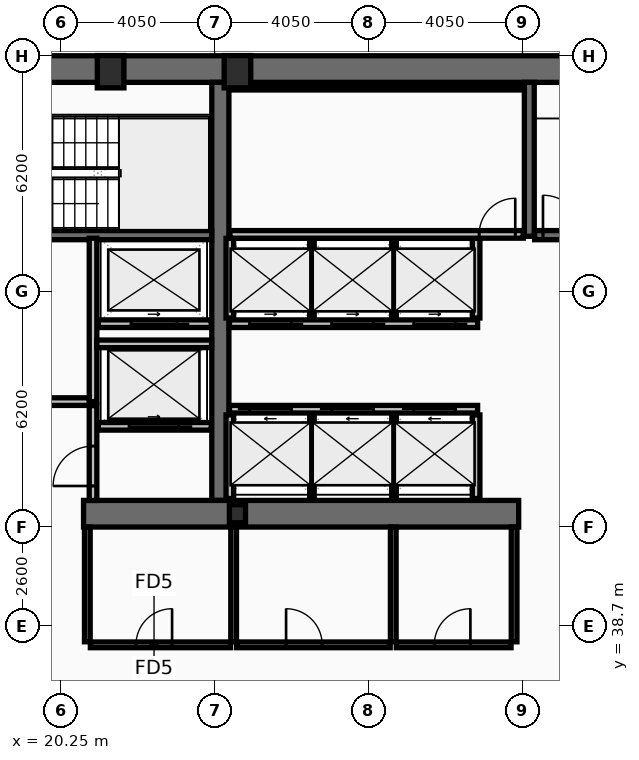
"""IFC4 building model, lengths in metres.
Left out: names, types, materials, properties, quantities, classifications, styles, units other than length and angle.
Written with IfcOpenShell. Run it as: python <this file> out.ifc"""

import sys

from ifc_helpers import new_model, si_unit, direction, frame, frame_2d, origin, origin_2d, place, context, subcontext, project, spatial, rectangle, hollow_rectangle, i_section, extrude, element, fill, save


model = new_model("IFC4")
c1 = context("Model", 3, precision=1e-05, world=origin(), true_north=direction((0.0, 1.0)))
c2 = subcontext(c1, "Body", "Model", "MODEL_VIEW")
j1 = project(units=[si_unit("LENGTHUNIT", "METRE"), si_unit("PLANEANGLEUNIT", "RADIAN")], contexts=[c1])
p1 = place(None, origin())
s1 = spatial("IfcSite", under=j1, at=p1, CompositionType="ELEMENT")
p2 = place(p1, origin())
s2 = spatial("IfcBuilding", under=s1, at=p2, CompositionType="ELEMENT")
p3 = place(p2, frame((0.0, 0.0, 106.6)))
s3 = spatial("IfcBuildingStorey", under=s2, at=p3, CompositionType="ELEMENT", Elevation=106.6)
p4 = place(p3, frame((16.2, 53.35, 0.0), z_axis=(0.0, 0.0, 1.0), x_axis=(1.0, 0.0, 0.0)))
e1 = element("IfcWall", 1, at=p4, inside=s3, PredefinedType="SHEAR", context=c2, shape_type="SweptSolid", body=[
    extrude(rectangle(XDim=40.5, YDim=0.7, at=frame_2d((20.25, 0.0))), origin(), (0.0, 0.0, 1.0), 4.24),
])
p5 = place(p3, frame((24.45, 42.0, 0.0), z_axis=(0.0, 0.0, 1.0), x_axis=(0.0, 1.0, 0.0)))
e2 = element("IfcWall", 2, at=p5, inside=s3, PredefinedType="SHEAR", context=c2, shape_type="SweptSolid", body=[
    extrude(rectangle(XDim=11.0, YDim=0.45, at=frame_2d((5.5, 0.0))), origin(), (0.0, 0.0, 1.0), 4.24),
])
p6 = place(p3, frame((32.3, 41.65, 0.0), z_axis=(0.0, 0.0, 1.0), x_axis=(-1.0, 0.0, 0.0)))
e3 = element("IfcWall", 3, at=p6, inside=s3, PredefinedType="SHEAR", context=c2, shape_type="SweptSolid", body=[
    extrude(rectangle(XDim=11.45, YDim=0.7, at=frame_2d((5.725, 0.0))), origin(), (0.0, 0.0, 1.0), 4.24),
])
p7 = place(p3, frame((32.58, 48.95, 0.0), z_axis=(0.0, 0.0, 1.0), x_axis=(0.0, 1.0, 0.0)))
e4 = element("IfcWall", 4, at=p7, inside=s3, PredefinedType="SHEAR", context=c2, shape_type="SweptSolid", body=[
    extrude(rectangle(XDim=4.05, YDim=0.26, at=frame_2d((2.025, 0.0))), origin(), (0.0, 0.0, 1.0), 4.24),
])
p8 = place(p3, frame((16.9, 48.98, 0.0), z_axis=(0.0, 0.0, 1.0), x_axis=(1.0, 0.0, 0.0)))
e5 = element("IfcWall", 5, at=p8, inside=s3, PredefinedType="SHEAR", context=c2, shape_type="SweptSolid", body=[
    extrude(rectangle(XDim=7.32, YDim=0.24, at=frame_2d((3.66, 0.0))), origin(), (0.0, 0.0, 1.0), 4.24),
])
p9 = place(p8, frame((0.22, 0.0, 0.0)))
e6 = element("IfcOpeningElement", 6, at=p9, cuts=e5, PredefinedType="OPENING", context=c2, shape_type="SweptSolid", body=[
    extrude(rectangle(XDim=1.05, YDim=2.15, at=frame_2d((0.525, 1.075))), frame((0.0, 0.13, 0.0), z_axis=(0.0, -1.0, 0.0), x_axis=(1.0, 0.0, 0.0)), (0.0, 0.0, 1.0), 0.26),
])
p10 = place(p3, frame((32.72, 48.98, 0.0), z_axis=(0.0, 0.0, 1.0), x_axis=(1.0, 0.0, 0.0)))
e7 = element("IfcWall", 7, at=p10, inside=s3, PredefinedType="SHEAR", context=c2, shape_type="SweptSolid", body=[
    extrude(rectangle(XDim=7.56, YDim=0.24, at=frame_2d((3.78, 0.0))), origin(), (0.0, 0.0, 1.0), 4.24),
])
p11 = place(p10, frame((0.22, 0.0, 0.0)))
e8 = element("IfcOpeningElement", 8, at=p11, cuts=e7, PredefinedType="OPENING", context=c2, shape_type="SweptSolid", body=[
    extrude(rectangle(XDim=1.05, YDim=2.15, at=frame_2d((0.525, 1.075))), frame((0.0, 0.13, 0.0), z_axis=(0.0, -1.0, 0.0), x_axis=(1.0, 0.0, 0.0)), (0.0, 0.0, 1.0), 0.26),
])
for number, where, z_axis, x_axis in (
    (9, (21.562, 53.28, 0.0), (0.0, 0.0, 1.0), (1.0, 0.0, 0.0)),
    (10, (24.9, 53.28, 0.0), (0.0, 0.0, 1.0), (1.0, 0.0, 0.0)),
):
    element("IfcColumn", number, at=place(p3, frame(where, z_axis=z_axis, x_axis=x_axis)), inside=s3, PredefinedType="COLUMN", context=c2, shape_type="SweptSolid", body=[
        extrude(hollow_rectangle(XDim=0.7, YDim=0.85, WallThickness=0.05, at=origin_2d()), origin(), (0.0, 0.0, 1.0), 4.4),
    ])
p12 = place(p3, frame((24.9, 41.65, 0.0), z_axis=(0.0, 0.0, 1.0), x_axis=(1.0, 0.0, 0.0)))
e11 = element("IfcColumn", 11, at=p12, inside=s3, PredefinedType="COLUMN", context=c2, shape_type="SweptSolid", body=[
    extrude(i_section(OverallWidth=0.424, OverallDepth=0.474, WebThickness=0.048, FlangeThickness=0.077, at=origin_2d()), origin(), (0.0, 0.0, 1.0), 4.4),
])
p13 = place(p3, frame((24.69, 44.4, 0.0), z_axis=(0.0, 0.0, 1.0), x_axis=(1.0, 0.0, 0.0)))
e12 = element("IfcWall", 12, at=p13, inside=s3, PredefinedType="PARTITIONING", context=c2, shape_type="SweptSolid", body=[
    extrude(rectangle(XDim=6.53, YDim=0.2, at=frame_2d((3.265, 0.0))), origin(), (0.0, 0.0, 1.0), 4.24),
])
p14 = place(p13, frame((0.53, 0.0, 0.0)))
e13 = element("IfcOpeningElement", 13, at=p14, cuts=e12, PredefinedType="OPENING", context=c2, shape_type="SweptSolid", body=[
    extrude(rectangle(XDim=1.1, YDim=2.18, at=frame_2d((0.55, 1.09))), frame((0.0, 0.11, 0.0), z_axis=(0.0, -1.0, 0.0), x_axis=(1.0, 0.0, 0.0)), (0.0, 0.0, 1.0), 0.22),
])
p15 = place(p13, frame((2.69, 0.0, 0.0)))
e14 = element("IfcOpeningElement", 14, at=p15, cuts=e12, PredefinedType="OPENING", context=c2, shape_type="SweptSolid", body=[
    extrude(rectangle(XDim=1.1, YDim=2.18, at=frame_2d((0.55, 1.09))), frame((0.0, 0.11, 0.0), z_axis=(0.0, -1.0, 0.0), x_axis=(1.0, 0.0, 0.0)), (0.0, 0.0, 1.0), 0.22),
])
p16 = place(p13, frame((4.85, 0.0, 0.0)))
e15 = element("IfcOpeningElement", 15, at=p16, cuts=e12, PredefinedType="OPENING", context=c2, shape_type="SweptSolid", body=[
    extrude(rectangle(XDim=1.1, YDim=2.18, at=frame_2d((0.55, 1.09))), frame((0.0, 0.11, 0.0), z_axis=(0.0, -1.0, 0.0), x_axis=(1.0, 0.0, 0.0)), (0.0, 0.0, 1.0), 0.22),
])
p17 = place(p3, frame((24.21, 43.95, 0.0), z_axis=(0.0, 0.0, 1.0), x_axis=(-1.0, 0.0, 0.0)))
e16 = element("IfcWall", 16, at=p17, inside=s3, PredefinedType="PARTITIONING", context=c2, shape_type="SweptSolid", body=[
    extrude(rectangle(XDim=2.97, YDim=0.2, at=frame_2d((1.485, 0.0))), origin(), (0.0, 0.0, 1.0), 4.24),
])
p18 = place(p17, frame((0.86, 0.0, 0.0)))
e17 = element("IfcOpeningElement", 17, at=p18, cuts=e16, PredefinedType="OPENING", context=c2, shape_type="SweptSolid", body=[
    extrude(rectangle(XDim=1.3, YDim=2.18, at=frame_2d((0.65, 1.09))), frame((0.0, 0.11, 0.0), z_axis=(0.0, -1.0, 0.0), x_axis=(1.0, 0.0, 0.0)), (0.0, 0.0, 1.0), 0.22),
])
p19 = place(p3, frame((24.21, 46.65, 0.0), z_axis=(0.0, 0.0, 1.0), x_axis=(-1.0, 0.0, 0.0)))
e18 = element("IfcWall", 18, at=p19, inside=s3, PredefinedType="PARTITIONING", context=c2, shape_type="SweptSolid", body=[
    extrude(rectangle(XDim=2.97, YDim=0.2, at=frame_2d((1.485, 0.0))), origin(), (0.0, 0.0, 1.0), 4.24),
])
p20 = place(p19, frame((0.91, 0.0, 0.0)))
e19 = element("IfcOpeningElement", 19, at=p20, cuts=e18, PredefinedType="OPENING", context=c2, shape_type="SweptSolid", body=[
    extrude(rectangle(XDim=1.2, YDim=2.18, at=frame_2d((0.6, 1.09))), frame((0.0, 0.11, 0.0), z_axis=(0.0, -1.0, 0.0), x_axis=(1.0, 0.0, 0.0)), (0.0, 0.0, 1.0), 0.22),
])
p21 = place(p3, frame((31.22, 46.65, 0.0), z_axis=(0.0, 0.0, 1.0), x_axis=(-1.0, 0.0, 0.0)))
e20 = element("IfcWall", 20, at=p21, inside=s3, PredefinedType="PARTITIONING", context=c2, shape_type="SweptSolid", body=[
    extrude(rectangle(XDim=6.53, YDim=0.2, at=frame_2d((3.265, 0.0))), origin(), (0.0, 0.0, 1.0), 4.24),
])
p22 = place(p21, frame((4.9, 0.0, 0.0)))
e21 = element("IfcOpeningElement", 21, at=p22, cuts=e20, PredefinedType="OPENING", context=c2, shape_type="SweptSolid", body=[
    extrude(rectangle(XDim=1.1, YDim=2.18, at=frame_2d((0.55, 1.09))), frame((0.0, 0.11, 0.0), z_axis=(0.0, -1.0, 0.0), x_axis=(1.0, 0.0, 0.0)), (0.0, 0.0, 1.0), 0.22),
])
p23 = place(p21, frame((2.74, 0.0, 0.0)))
e22 = element("IfcOpeningElement", 22, at=p23, cuts=e20, PredefinedType="OPENING", context=c2, shape_type="SweptSolid", body=[
    extrude(rectangle(XDim=1.1, YDim=2.18, at=frame_2d((0.55, 1.09))), frame((0.0, 0.11, 0.0), z_axis=(0.0, -1.0, 0.0), x_axis=(1.0, 0.0, 0.0)), (0.0, 0.0, 1.0), 0.22),
])
p24 = place(p21, frame((0.58, 0.0, 0.0)))
e23 = element("IfcOpeningElement", 23, at=p24, cuts=e20, PredefinedType="OPENING", context=c2, shape_type="SweptSolid", body=[
    extrude(rectangle(XDim=1.1, YDim=2.18, at=frame_2d((0.55, 1.09))), frame((0.0, 0.11, 0.0), z_axis=(0.0, -1.0, 0.0), x_axis=(1.0, 0.0, 0.0)), (0.0, 0.0, 1.0), 0.22),
])
p25 = place(p3, frame((21.1, 44.6, 0.0), z_axis=(0.0, 0.0, 1.0), x_axis=(0.0, 1.0, 0.0)))
e24 = element("IfcWall", 24, at=p25, inside=s3, PredefinedType="PARTITIONING", context=c2, shape_type="SweptSolid", body=[
    extrude(rectangle(XDim=4.3, YDim=0.2, at=frame_2d((2.15, 0.0))), origin(), (0.0, 0.0, 1.0), 4.24),
])
p26 = place(p3, frame((16.9, 44.6, 0.0), z_axis=(0.0, 0.0, 1.0), x_axis=(1.0, 0.0, 0.0)))
e25 = element("IfcWall", 25, at=p26, inside=s3, PredefinedType="PARTITIONING", context=c2, shape_type="SweptSolid", body=[
    extrude(rectangle(XDim=4.1, YDim=0.2, at=frame_2d((2.05, 0.0))), origin(), (0.0, 0.0, 1.0), 4.24),
])
p27 = place(p26, frame((1.25, 0.0, 0.0)))
e26 = element("IfcOpeningElement", 26, at=p27, cuts=e25, PredefinedType="OPENING", context=c2, shape_type="SweptSolid", body=[
    extrude(rectangle(XDim=1.05, YDim=2.15, at=frame_2d((0.525, 1.075))), frame((0.0, 0.11, 0.0), z_axis=(0.0, -1.0, 0.0), x_axis=(1.0, 0.0, 0.0)), (0.0, 0.0, 1.0), 0.22),
])
p28 = place(p3, frame((21.2, 46.12, 0.0), z_axis=(0.0, 0.0, 1.0), x_axis=(1.0, 0.0, 0.0)))
e27 = element("IfcWall", 27, at=p28, inside=s3, PredefinedType="PARTITIONING", context=c2, shape_type="SweptSolid", body=[
    extrude(rectangle(XDim=3.02, YDim=0.2, at=frame_2d((1.51, 0.0))), origin(), (0.0, 0.0, 1.0), 4.24),
])
p29 = place(p3, frame((21.1, 42.0, 0.0), z_axis=(0.0, 0.0, 1.0), x_axis=(0.0, 1.0, 0.0)))
e28 = element("IfcWall", 28, at=p29, inside=s3, PredefinedType="PARTITIONING", context=c2, shape_type="SweptSolid", body=[
    extrude(rectangle(XDim=2.495, YDim=0.2, at=frame_2d((1.248, 0.0))), origin(), (0.0, 0.0, 1.0), 4.24),
])
p30 = place(p29, frame((0.38, 0.0, 0.0)))
e29 = element("IfcOpeningElement", 29, at=p30, cuts=e28, PredefinedType="OPENING", context=c2, shape_type="SweptSolid", body=[
    extrude(rectangle(XDim=1.05, YDim=2.15, at=frame_2d((0.525, 1.075))), frame((0.0, 0.11, 0.0), z_axis=(0.0, -1.0, 0.0), x_axis=(1.0, 0.0, 0.0)), (0.0, 0.0, 1.0), 0.22),
])
for number, where, z_axis, x_axis in (
    (30, (24.7, 46.8, 0.0), (0.0, 0.0, 1.0), (0.0, 1.0, 0.0)),
    (31, (31.18, 46.8, 0.0), (0.0, 0.0, 1.0), (0.0, 1.0, 0.0)),
):
    element("IfcWall", number, at=place(p3, frame(where, z_axis=z_axis, x_axis=x_axis)), inside=s3, PredefinedType="PARTITIONING", context=c2, shape_type="SweptSolid", body=[
        extrude(rectangle(XDim=2.095, YDim=0.2, at=frame_2d((1.047, 0.0))), origin(), (0.0, 0.0, 1.0), 4.24),
    ])
for number, where, z_axis, x_axis in (
    (32, (26.86, 46.8, 0.0), (0.0, 0.0, 1.0), (0.0, 1.0, 0.0)),
    (33, (29.02, 46.8, 0.0), (0.0, 0.0, 1.0), (0.0, 1.0, 0.0)),
):
    element("IfcWall", number, at=place(p3, frame(where, z_axis=z_axis, x_axis=x_axis)), inside=s3, PredefinedType="PARTITIONING", context=c2, shape_type="SweptSolid", body=[
        extrude(rectangle(XDim=2.095, YDim=0.12, at=frame_2d((1.047, 0.0))), origin(), (0.0, 0.0, 1.0), 4.24),
    ])
for number, where, z_axis, x_axis in (
    (34, (24.7, 42.05, 0.0), (0.0, 0.0, 1.0), (0.0, 1.0, 0.0)),
    (35, (31.18, 42.05, 0.0), (0.0, 0.0, 1.0), (0.0, 1.0, 0.0)),
):
    element("IfcWall", number, at=place(p3, frame(where, z_axis=z_axis, x_axis=x_axis)), inside=s3, PredefinedType="PARTITIONING", context=c2, shape_type="SweptSolid", body=[
        extrude(rectangle(XDim=2.2, YDim=0.2, at=frame_2d((1.1, 0.0))), origin(), (0.0, 0.0, 1.0), 4.24),
    ])
for number, where, z_axis, x_axis in (
    (36, (26.86, 42.05, 0.0), (0.0, 0.0, 1.0), (0.0, 1.0, 0.0)),
    (37, (29.02, 42.05, 0.0), (0.0, 0.0, 1.0), (0.0, 1.0, 0.0)),
):
    element("IfcWall", number, at=place(p3, frame(where, z_axis=z_axis, x_axis=x_axis)), inside=s3, PredefinedType="PARTITIONING", context=c2, shape_type="SweptSolid", body=[
        extrude(rectangle(XDim=2.2, YDim=0.12, at=frame_2d((1.1, 0.0))), origin(), (0.0, 0.0, 1.0), 4.24),
    ])
p31 = place(p3, frame((24.7, 52.86, 0.0), z_axis=(0.0, 0.0, 1.0), x_axis=(1.0, 0.0, 0.0)))
e38 = element("IfcWall", 38, at=p31, inside=s3, PredefinedType="PARTITIONING", context=c2, shape_type="SweptSolid", body=[
    extrude(rectangle(XDim=7.72, YDim=0.12, at=frame_2d((3.86, 0.0))), origin(), (0.0, 0.0, 1.0), 4.24),
])
p32 = place(p3, frame((24.7, 49.0, 0.0), z_axis=(0.0, 0.0, 1.0), x_axis=(1.0, 0.0, 0.0)))
e39 = element("IfcWall", 39, at=p32, inside=s3, PredefinedType="PARTITIONING", context=c2, shape_type="SweptSolid", body=[
    extrude(rectangle(XDim=7.72, YDim=0.2, at=frame_2d((3.86, 0.0))), origin(), (0.0, 0.0, 1.0), 4.24),
])
p33 = place(p32, frame((6.56, 0.0, 0.0)))
e40 = element("IfcOpeningElement", 40, at=p33, cuts=e39, PredefinedType="OPENING", context=c2, shape_type="SweptSolid", body=[
    extrude(rectangle(XDim=0.95, YDim=2.1, at=frame_2d((0.475, 1.05))), frame((0.0, 0.11, 0.0), z_axis=(0.0, -1.0, 0.0), x_axis=(1.0, 0.0, 0.0)), (0.0, 0.0, 1.0), 0.22),
])
p34 = place(p3, frame((21.03, 38.2, 0.0), z_axis=(0.0, 0.0, 1.0), x_axis=(1.0, 0.0, 0.0)))
e41 = element("IfcWall", 41, at=p34, inside=s3, PredefinedType="PARTITIONING", context=c2, shape_type="SweptSolid", body=[
    extrude(rectangle(XDim=3.69, YDim=0.15, at=frame_2d((1.845, 0.0))), origin(), (0.0, 0.0, 1.0), 3.53),
])
p35 = place(p34, frame((1.2, 0.0, 0.0)))
e42 = element("IfcOpeningElement", 42, at=p35, cuts=e41, PredefinedType="OPENING", context=c2, shape_type="SweptSolid", body=[
    extrude(rectangle(XDim=0.95, YDim=2.05, at=frame_2d((0.475, 1.025))), frame((0.0, 0.085, 0.0), z_axis=(0.0, -1.0, 0.0), x_axis=(1.0, 0.0, 0.0)), (0.0, 0.0, 1.0), 0.17),
])
p36 = place(p3, frame((24.88, 38.2, 0.0), z_axis=(0.0, 0.0, 1.0), x_axis=(1.0, 0.0, 0.0)))
e43 = element("IfcWall", 43, at=p36, inside=s3, PredefinedType="PARTITIONING", context=c2, shape_type="SweptSolid", body=[
    extrude(rectangle(XDim=4.04, YDim=0.15, at=frame_2d((2.02, 0.0))), origin(), (0.0, 0.0, 1.0), 3.53),
])
p37 = place(p36, frame((1.3, 0.0, 0.0)))
e44 = element("IfcOpeningElement", 44, at=p37, cuts=e43, PredefinedType="OPENING", context=c2, shape_type="SweptSolid", body=[
    extrude(rectangle(XDim=0.95, YDim=2.05, at=frame_2d((0.475, 1.025))), frame((0.0, 0.085, 0.0), z_axis=(0.0, -1.0, 0.0), x_axis=(1.0, 0.0, 0.0)), (0.0, 0.0, 1.0), 0.17),
])
p38 = place(p3, frame((29.08, 38.2, 0.0), z_axis=(0.0, 0.0, 1.0), x_axis=(1.0, 0.0, 0.0)))
e45 = element("IfcWall", 45, at=p38, inside=s3, PredefinedType="PARTITIONING", context=c2, shape_type="SweptSolid", body=[
    extrude(rectangle(XDim=3.02, YDim=0.15, at=frame_2d((1.51, 0.0))), origin(), (0.0, 0.0, 1.0), 3.53),
])
p39 = place(p38, frame((1.0, 0.0, 0.0)))
e46 = element("IfcOpeningElement", 46, at=p39, cuts=e45, PredefinedType="OPENING", context=c2, shape_type="SweptSolid", body=[
    extrude(rectangle(XDim=0.95, YDim=2.05, at=frame_2d((0.475, 1.025))), frame((0.0, 0.085, 0.0), z_axis=(0.0, -1.0, 0.0), x_axis=(1.0, 0.0, 0.0)), (0.0, 0.0, 1.0), 0.17),
])
p40 = place(p3, frame((20.95, 38.28, 0.0), z_axis=(0.0, 0.0, 1.0), x_axis=(0.0, 1.0, 0.0)))
e47 = element("IfcWall", 47, at=p40, inside=s3, PredefinedType="PARTITIONING", context=c2, shape_type="SweptSolid", body=[
    extrude(rectangle(XDim=3.02, YDim=0.15, at=frame_2d((1.51, 0.0))), origin(), (0.0, 0.0, 1.0), 4.24),
])
p41 = place(p3, frame((24.8, 38.28, 0.0), z_axis=(0.0, 0.0, 1.0), x_axis=(0.0, 1.0, 0.0)))
e48 = element("IfcWall", 48, at=p41, inside=s3, PredefinedType="PARTITIONING", context=c2, shape_type="SweptSolid", body=[
    extrude(rectangle(XDim=3.02, YDim=0.15, at=frame_2d((1.51, 0.0))), origin(), (0.0, 0.0, 1.0), 3.53),
])
for number, where, z_axis, x_axis in (
    (49, (29.0, 38.28, 0.0), (0.0, 0.0, 1.0), (0.0, 1.0, 0.0)),
    (50, (32.18, 38.28, 0.0), (0.0, 0.0, 1.0), (0.0, 1.0, 0.0)),
):
    element("IfcWall", number, at=place(p3, frame(where, z_axis=z_axis, x_axis=x_axis)), inside=s3, PredefinedType="PARTITIONING", context=c2, shape_type="SweptSolid", body=[
        extrude(rectangle(XDim=3.02, YDim=0.15, at=frame_2d((1.51, 0.0))), origin(), (0.0, 0.0, 1.0), 4.24),
    ])
p42 = place(p11, origin())
e51 = element("IfcDoor", 51, at=p42, inside=s3, OperationType="SINGLE_SWING_LEFT", PredefinedType="DOOR", context=c2, shape_type="SweptSolid", body=[
    extrude(rectangle(XDim=1.05, YDim=2.15, at=frame_2d((0.525, 1.075))), frame((0.0, 0.025, 0.0), z_axis=(0.0, -1.0, 0.0), x_axis=(1.0, 0.0, 0.0)), (0.0, 0.0, 1.0), 0.05),
])
fill(e8, e51)
p43 = place(p14, origin())
e52 = element("IfcDoor", 52, at=p43, inside=s3, OperationType="SLIDING_TO_LEFT", PredefinedType="DOOR", context=c2, shape_type="SweptSolid", body=[
    extrude(rectangle(XDim=1.1, YDim=2.18, at=frame_2d((0.55, 1.09))), frame((0.0, 0.025, 0.0), z_axis=(0.0, -1.0, 0.0), x_axis=(1.0, 0.0, 0.0)), (0.0, 0.0, 1.0), 0.05),
])
fill(e13, e52)
p44 = place(p15, origin())
e53 = element("IfcDoor", 53, at=p44, inside=s3, OperationType="SLIDING_TO_LEFT", PredefinedType="DOOR", context=c2, shape_type="SweptSolid", body=[
    extrude(rectangle(XDim=1.1, YDim=2.18, at=frame_2d((0.55, 1.09))), frame((0.0, 0.025, 0.0), z_axis=(0.0, -1.0, 0.0), x_axis=(1.0, 0.0, 0.0)), (0.0, 0.0, 1.0), 0.05),
])
fill(e14, e53)
p45 = place(p16, origin())
e54 = element("IfcDoor", 54, at=p45, inside=s3, OperationType="SLIDING_TO_LEFT", PredefinedType="DOOR", context=c2, shape_type="SweptSolid", body=[
    extrude(rectangle(XDim=1.1, YDim=2.18, at=frame_2d((0.55, 1.09))), frame((0.0, 0.025, 0.0), z_axis=(0.0, -1.0, 0.0), x_axis=(1.0, 0.0, 0.0)), (0.0, 0.0, 1.0), 0.05),
])
fill(e15, e54)
p46 = place(p18, origin())
e55 = element("IfcDoor", 55, at=p46, inside=s3, OperationType="SLIDING_TO_LEFT", PredefinedType="DOOR", context=c2, shape_type="SweptSolid", body=[
    extrude(rectangle(XDim=1.3, YDim=2.18, at=frame_2d((0.65, 1.09))), frame((0.0, 0.025, 0.0), z_axis=(0.0, -1.0, 0.0), x_axis=(1.0, 0.0, 0.0)), (0.0, 0.0, 1.0), 0.05),
])
fill(e17, e55)
p47 = place(p20, origin())
e56 = element("IfcDoor", 56, at=p47, inside=s3, OperationType="SLIDING_TO_LEFT", PredefinedType="DOOR", context=c2, shape_type="SweptSolid", body=[
    extrude(rectangle(XDim=1.2, YDim=2.18, at=frame_2d((0.6, 1.09))), frame((0.0, 0.025, 0.0), z_axis=(0.0, -1.0, 0.0), x_axis=(1.0, 0.0, 0.0)), (0.0, 0.0, 1.0), 0.05),
])
fill(e19, e56)
p48 = place(p22, origin())
e57 = element("IfcDoor", 57, at=p48, inside=s3, OperationType="SLIDING_TO_LEFT", PredefinedType="DOOR", context=c2, shape_type="SweptSolid", body=[
    extrude(rectangle(XDim=1.1, YDim=2.18, at=frame_2d((0.55, 1.09))), frame((0.0, 0.025, 0.0), z_axis=(0.0, -1.0, 0.0), x_axis=(1.0, 0.0, 0.0)), (0.0, 0.0, 1.0), 0.05),
])
fill(e21, e57)
p49 = place(p23, origin())
e58 = element("IfcDoor", 58, at=p49, inside=s3, OperationType="SLIDING_TO_LEFT", PredefinedType="DOOR", context=c2, shape_type="SweptSolid", body=[
    extrude(rectangle(XDim=1.1, YDim=2.18, at=frame_2d((0.55, 1.09))), frame((0.0, 0.025, 0.0), z_axis=(0.0, -1.0, 0.0), x_axis=(1.0, 0.0, 0.0)), (0.0, 0.0, 1.0), 0.05),
])
fill(e22, e58)
p50 = place(p24, origin())
e59 = element("IfcDoor", 59, at=p50, inside=s3, OperationType="SLIDING_TO_LEFT", PredefinedType="DOOR", context=c2, shape_type="SweptSolid", body=[
    extrude(rectangle(XDim=1.1, YDim=2.18, at=frame_2d((0.55, 1.09))), frame((0.0, 0.025, 0.0), z_axis=(0.0, -1.0, 0.0), x_axis=(1.0, 0.0, 0.0)), (0.0, 0.0, 1.0), 0.05),
])
fill(e23, e59)
p51 = place(p30, origin())
e60 = element("IfcDoor", 60, at=p51, inside=s3, OperationType="SINGLE_SWING_LEFT", PredefinedType="DOOR", context=c2, shape_type="SweptSolid", body=[
    extrude(rectangle(XDim=1.05, YDim=2.15, at=frame_2d((0.525, 1.075))), frame((0.0, 0.025, 0.0), z_axis=(0.0, -1.0, 0.0), x_axis=(1.0, 0.0, 0.0)), (0.0, 0.0, 1.0), 0.05),
])
fill(e29, e60)
p52 = place(p33, origin())
e61 = element("IfcDoor", 61, at=p52, inside=s3, OperationType="SINGLE_SWING_RIGHT", PredefinedType="DOOR", context=c2, shape_type="SweptSolid", body=[
    extrude(rectangle(XDim=0.95, YDim=2.1, at=frame_2d((0.475, 1.05))), frame((0.0, 0.025, 0.0), z_axis=(0.0, -1.0, 0.0), x_axis=(1.0, 0.0, 0.0)), (0.0, 0.0, 1.0), 0.05),
])
fill(e40, e61)
p53 = place(p35, origin())
e62 = element("IfcDoor", 62, at=p53, inside=s3, OperationType="SINGLE_SWING_RIGHT", PredefinedType="DOOR", context=c2, shape_type="SweptSolid", body=[
    extrude(rectangle(XDim=0.95, YDim=2.05, at=frame_2d((0.475, 1.025))), frame((0.0, 0.025, 0.0), z_axis=(0.0, -1.0, 0.0), x_axis=(1.0, 0.0, 0.0)), (0.0, 0.0, 1.0), 0.05),
])
fill(e42, e62)
p54 = place(p37, origin())
e63 = element("IfcDoor", 63, at=p54, inside=s3, OperationType="SINGLE_SWING_LEFT", PredefinedType="DOOR", context=c2, shape_type="SweptSolid", body=[
    extrude(rectangle(XDim=0.95, YDim=2.05, at=frame_2d((0.475, 1.025))), frame((0.0, 0.025, 0.0), z_axis=(0.0, -1.0, 0.0), x_axis=(1.0, 0.0, 0.0)), (0.0, 0.0, 1.0), 0.05),
])
fill(e44, e63)
p55 = place(p39, origin())
e64 = element("IfcDoor", 64, at=p55, inside=s3, OperationType="SINGLE_SWING_RIGHT", PredefinedType="DOOR", context=c2, shape_type="SweptSolid", body=[
    extrude(rectangle(XDim=0.95, YDim=2.05, at=frame_2d((0.475, 1.025))), frame((0.0, 0.025, 0.0), z_axis=(0.0, -1.0, 0.0), x_axis=(1.0, 0.0, 0.0)), (0.0, 0.0, 1.0), 0.05),
])
fill(e46, e64)
save(model, sys.argv[1])
